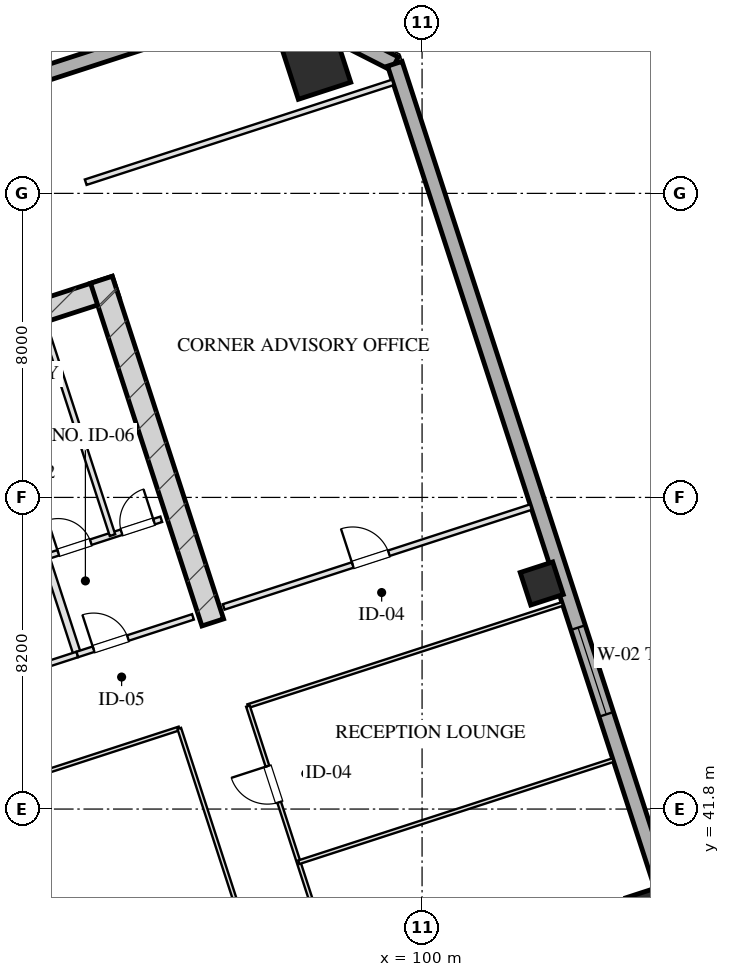
"""IFC4 building model, lengths in metres.
Left out: names, types, materials, properties, quantities, classifications, styles, units other than length and angle.
Written with IfcOpenShell. Run it as: python <this file> out.ifc"""

import sys

from ifc_helpers import new_model, si_unit, direction, frame, frame_2d, origin, origin_2d, place, context, subcontext, project, spatial, rectangle, hollow_rectangle, extrude, element, fill, save


model = new_model("IFC4")
c1 = context("Model", 3, precision=1e-05, world=origin(), true_north=direction((0.0, 1.0)))
c2 = subcontext(c1, "Body", "Model", "MODEL_VIEW")
j1 = project(units=[si_unit("LENGTHUNIT", "METRE"), si_unit("PLANEANGLEUNIT", "RADIAN")], contexts=[c1])
p1 = place(None, origin())
s1 = spatial("IfcSite", under=j1, at=p1, CompositionType="ELEMENT")
p2 = place(p1, origin())
s2 = spatial("IfcBuilding", under=s1, at=p2, CompositionType="ELEMENT")
p3 = place(p2, frame((0.0, 0.0, 106.95)))
s3 = spatial("IfcBuildingStorey", under=s2, at=p3, CompositionType="ELEMENT", Elevation=106.95)
p4 = place(p3, frame((76.344, 50.466, 0.0), z_axis=(0.0, 0.0, 1.0), x_axis=(0.951055727519, 0.309019421968, 0.0)))
e1 = element("IfcWall", 1, at=p4, inside=s3, PredefinedType="SHEAR", context=c2, shape_type="SweptSolid", body=[
    extrude(rectangle(XDim=16.4, YDim=0.6, at=frame_2d((8.2, 0.0))), origin(), (0.0, 0.0, 1.0), 3.45),
])
p5 = place(p3, frame((94.492, 46.71, 0.0), z_axis=(0.0, 0.0, 1.0), x_axis=(-0.309010370028, 0.95105866865, 0.0)))
e2 = element("IfcWall", 2, at=p5, inside=s3, PredefinedType="SHEAR", context=c2, shape_type="SweptSolid", body=[
    extrude(rectangle(XDim=9.48, YDim=0.6, at=frame_2d((4.74, 0.0))), origin(), (0.0, 0.0, 1.0), 3.45),
])
p6 = place(p3, frame((97.209, 61.388, 0.0), z_axis=(0.0, 0.0, 1.0), x_axis=(0.951056516295, 0.309016994375, 0.0)))
e3 = element("IfcColumn", 3, at=p6, inside=s3, PredefinedType="COLUMN", context=c2, shape_type="SweptSolid", body=[
    extrude(hollow_rectangle(XDim=1.45, YDim=1.45, WallThickness=0.05, at=origin_2d()), origin(), (0.0, 0.0, 1.0), 3.451),
])
for number, where, z_axis, x_axis in (
    (4, (105.93, 39.176, 0.0), (0.0, 0.0, 1.0), (0.951, 0.309, 0.0)),
    (5, (103.149, 47.736, 0.0), (0.0, 0.0, 1.0), (0.951, 0.309, 0.0)),
):
    element("IfcColumn", number, at=place(p3, frame(where, z_axis=z_axis, x_axis=x_axis)), inside=s3, PredefinedType="COLUMN", context=c2, shape_type="SweptSolid", body=[
        extrude(hollow_rectangle(XDim=0.9, YDim=0.9, WallThickness=0.032, at=origin_2d()), origin(), (0.0, 0.0, 1.0), 3.451),
    ])
p7 = place(p3, frame((68.047, 53.995, 0.0), z_axis=(0.0, 0.0, 1.0), x_axis=(0.95105505922, 0.309021478754, 0.0)))
e6 = element("IfcWall", 6, at=p7, inside=s3, PredefinedType="SOLIDWALL", context=c2, shape_type="SweptSolid", body=[
    extrude(rectangle(XDim=29.4, YDim=0.4, at=frame_2d((14.7, 0.0))), origin(), (0.0, 0.0, 1.0), 2.61),
])
p8 = place(p3, frame((96.008, 63.08, 0.0), z_axis=(0.0, 0.0, 1.0), x_axis=(0.891001999643, -0.45399937955, 0.0)))
e7 = element("IfcWall", 7, at=p8, inside=s3, PredefinedType="SOLIDWALL", context=c2, shape_type="SweptSolid", body=[
    extrude(rectangle(XDim=3.677, YDim=0.4, at=frame_2d((1.839, 0.0))), origin(), (0.0, 0.0, 1.0), 2.61),
])
p9 = place(p3, frame((99.284, 61.41, 0.0), z_axis=(0.0, 0.0, 1.0), x_axis=(0.309017542002, -0.95105633836, 0.0)))
e8 = element("IfcWall", 8, at=p9, inside=s3, PredefinedType="SOLIDWALL", context=c2, shape_type="SweptSolid", body=[
    extrude(rectangle(XDim=46.4, YDim=0.4, at=frame_2d((23.2, 0.0))), origin(), (0.0, 0.0, 1.0), 2.61),
])
p10 = place(p9, frame((28.4, 0.0, 0.75)))
e9 = element("IfcOpeningElement", 9, at=p10, cuts=e8, PredefinedType="OPENING", context=c2, shape_type="SweptSolid", body=[
    extrude(rectangle(XDim=2.4, YDim=1.46, at=frame_2d((1.2, 0.73))), frame((0.0, 0.21, 0.0), z_axis=(0.0, -1.0, 0.0), x_axis=(1.0, 0.0, 0.0)), (0.0, 0.0, 1.0), 0.42),
])
p11 = place(p9, frame((15.6, 0.0, 0.75)))
e10 = element("IfcOpeningElement", 10, at=p11, cuts=e8, PredefinedType="OPENING", context=c2, shape_type="SweptSolid", body=[
    extrude(rectangle(XDim=2.4, YDim=1.46, at=frame_2d((1.2, 0.73))), frame((0.0, 0.21, 0.0), z_axis=(0.0, -1.0, 0.0), x_axis=(1.0, 0.0, 0.0)), (0.0, 0.0, 1.0), 0.42),
])
p12 = place(p3, frame((90.928, 45.868, 0.0), z_axis=(0.0, 0.0, 1.0), x_axis=(-0.309042196757, 0.951048327176, 0.0)))
e11 = element("IfcWall", 11, at=p12, inside=s3, PredefinedType="PARTITIONING", context=c2, shape_type="SweptSolid", body=[
    extrude(rectangle(XDim=8.43, YDim=0.2, at=frame_2d((4.215, 0.0))), origin(), (0.0, 0.0, 1.0), 3.175),
])
p13 = place(p3, frame((86.743, 44.508, 0.0), z_axis=(0.0, 0.0, 1.0), x_axis=(0.951063829732, 0.308994485023, 0.0)))
e12 = element("IfcWall", 12, at=p13, inside=s3, PredefinedType="PARTITIONING", context=c2, shape_type="SweptSolid", body=[
    extrude(rectangle(XDim=4.4, YDim=0.15, at=frame_2d((2.2, 0.0))), origin(), (0.0, 0.0, 1.0), 3.175),
])
p14 = place(p13, frame((1.45, 0.0, 0.0)))
e13 = element("IfcOpeningElement", 13, at=p14, cuts=e12, PredefinedType="OPENING", context=c2, shape_type="SweptSolid", body=[
    extrude(rectangle(XDim=1.5, YDim=2.05, at=frame_2d((0.75, 1.025))), frame((0.0, 0.085, 0.0), z_axis=(0.0, -1.0, 0.0), x_axis=(1.0, 0.0, 0.0)), (0.0, 0.0, 1.0), 0.17),
])
p15 = place(p3, frame((90.928, 45.868, 0.0), z_axis=(0.0, 0.0, 1.0), x_axis=(0.951059297078, 0.309008435874, 0.0)))
e14 = element("IfcWall", 14, at=p15, inside=s3, PredefinedType="PARTITIONING", context=c2, shape_type="SweptSolid", body=[
    extrude(rectangle(XDim=3.2, YDim=0.15, at=frame_2d((1.6, 0.0))), origin(), (0.0, 0.0, 1.0), 3.175),
])
p16 = place(p15, frame((0.45, 0.0, 0.0)))
e15 = element("IfcOpeningElement", 15, at=p16, cuts=e14, PredefinedType="OPENING", context=c2, shape_type="SweptSolid", body=[
    extrude(rectangle(XDim=0.95, YDim=2.05, at=frame_2d((0.475, 1.025))), frame((0.0, 0.085, 0.0), z_axis=(0.0, -1.0, 0.0), x_axis=(1.0, 0.0, 0.0)), (0.0, 0.0, 1.0), 0.17),
])
p17 = place(p3, frame((90.094, 48.436, 0.0), z_axis=(0.0, 0.0, 1.0), x_axis=(0.951066581729, 0.308986014439, 0.0)))
e16 = element("IfcWall", 16, at=p17, inside=s3, PredefinedType="PARTITIONING", context=c2, shape_type="SweptSolid", body=[
    extrude(rectangle(XDim=3.2, YDim=0.15, at=frame_2d((1.6, 0.0))), origin(), (0.0, 0.0, 1.0), 3.175),
])
p18 = place(p17, frame((0.35, 0.0, 0.0)))
e17 = element("IfcOpeningElement", 17, at=p18, cuts=e16, PredefinedType="OPENING", context=c2, shape_type="SweptSolid", body=[
    extrude(rectangle(XDim=0.9, YDim=2.05, at=frame_2d((0.45, 1.025))), frame((0.0, 0.085, 0.0), z_axis=(0.0, -1.0, 0.0), x_axis=(1.0, 0.0, 0.0)), (0.0, 0.0, 1.0), 0.17),
])
p19 = place(p17, frame((2.1, 0.0, 0.0)))
e18 = element("IfcOpeningElement", 18, at=p19, cuts=e16, PredefinedType="OPENING", context=c2, shape_type="SweptSolid", body=[
    extrude(rectangle(XDim=0.9, YDim=2.05, at=frame_2d((0.45, 1.025))), frame((0.0, 0.085, 0.0), z_axis=(0.0, -1.0, 0.0), x_axis=(1.0, 0.0, 0.0)), (0.0, 0.0, 1.0), 0.17),
])
p20 = place(p3, frame((91.853, 49.007, 0.0), z_axis=(0.0, 0.0, 1.0), x_axis=(-0.309022487551, 0.951054731437, 0.0)))
e19 = element("IfcWall", 19, at=p20, inside=s3, PredefinedType="PARTITIONING", context=c2, shape_type="SweptSolid", body=[
    extrude(rectangle(XDim=5.73, YDim=0.15, at=frame_2d((2.865, 0.0))), origin(), (0.0, 0.0, 1.0), 3.175),
])
p21 = place(p3, frame((91.149, 58.294, 0.0), z_axis=(0.0, 0.0, 1.0), x_axis=(0.951062770994, 0.308997743729, 0.0)))
e20 = element("IfcWall", 20, at=p21, inside=s3, PredefinedType="PARTITIONING", context=c2, shape_type="SweptSolid", body=[
    extrude(rectangle(XDim=8.5, YDim=0.15, at=frame_2d((4.25, 0.0))), origin(), (0.0, 0.0, 1.0), 3.175),
])
p22 = place(p3, frame((94.78, 47.119, 0.0), z_axis=(0.0, 0.0, 1.0), x_axis=(0.951054329824, 0.309023723562, 0.0)))
e21 = element("IfcWall", 21, at=p22, inside=s3, PredefinedType="PARTITIONING", context=c2, shape_type="SweptSolid", body=[
    extrude(rectangle(XDim=8.5, YDim=0.15, at=frame_2d((4.25, 0.0))), origin(), (0.0, 0.0, 1.0), 3.175),
])
p23 = place(p22, frame((3.57, 0.0, 0.0)))
e22 = element("IfcOpeningElement", 22, at=p23, cuts=e21, PredefinedType="OPENING", context=c2, shape_type="SweptSolid", body=[
    extrude(rectangle(XDim=1.0, YDim=2.05, at=frame_2d((0.5, 1.025))), frame((0.0, 0.085, 0.0), z_axis=(0.0, -1.0, 0.0), x_axis=(1.0, 0.0, 0.0)), (0.0, 0.0, 1.0), 0.17),
])
p24 = place(p3, frame((86.097, 41.48, 0.0), z_axis=(0.0, 0.0, 1.0), x_axis=(0.951060182336, 0.309005711233, 0.0)))
e23 = element("IfcWall", 23, at=p24, inside=s3, PredefinedType="MOVABLE", context=c2, shape_type="SweptSolid", body=[
    extrude(rectangle(XDim=7.9, YDim=0.1, at=frame_2d((3.95, 0.0))), origin(), (0.0, 0.0, 1.0), 3.175),
])
p25 = place(p3, frame((95.418, 44.509, 0.0), z_axis=(0.0, 0.0, 1.0), x_axis=(0.951055307445, 0.309020714809, 0.0)))
e24 = element("IfcWall", 24, at=p25, inside=s3, PredefinedType="MOVABLE", context=c2, shape_type="SweptSolid", body=[
    extrude(rectangle(XDim=8.7, YDim=0.1, at=frame_2d((4.35, 0.0))), origin(), (0.0, 0.0, 1.0), 3.175),
])
p26 = place(p3, frame((91.24, 25.655, 0.0), z_axis=(0.0, 0.0, 1.0), x_axis=(-0.30901773025, 0.951056277195, 0.0)))
e25 = element("IfcWall", 25, at=p26, inside=s3, PredefinedType="MOVABLE", context=c2, shape_type="SweptSolid", body=[
    extrude(rectangle(XDim=16.64, YDim=0.1, at=frame_2d((8.32, 0.0))), origin(), (0.0, 0.0, 1.0), 3.175),
])
p27 = place(p26, frame((3.204, 0.0, 0.0)))
e26 = element("IfcOpeningElement", 26, at=p27, cuts=e25, PredefinedType="OPENING", context=c2, shape_type="SweptSolid", body=[
    extrude(rectangle(XDim=1.1, YDim=2.05, at=frame_2d((0.55, 1.025))), frame((0.0, 0.06, 0.0), z_axis=(0.0, -1.0, 0.0), x_axis=(1.0, 0.0, 0.0)), (0.0, 0.0, 1.0), 0.12),
])
p28 = place(p26, frame((11.404, 0.0, 0.0)))
e27 = element("IfcOpeningElement", 27, at=p28, cuts=e25, PredefinedType="OPENING", context=c2, shape_type="SweptSolid", body=[
    extrude(rectangle(XDim=1.1, YDim=2.05, at=frame_2d((0.55, 1.025))), frame((0.0, 0.06, 0.0), z_axis=(0.0, -1.0, 0.0), x_axis=(1.0, 0.0, 0.0)), (0.0, 0.0, 1.0), 0.12),
])
p29 = place(p3, frame((98.753, 28.096, 0.0), z_axis=(0.0, 0.0, 1.0), x_axis=(-0.30901773025, 0.951056277195, 0.0)))
e28 = element("IfcWall", 28, at=p29, inside=s3, PredefinedType="MOVABLE", context=c2, shape_type="SweptSolid", body=[
    extrude(rectangle(XDim=16.64, YDim=0.1, at=frame_2d((8.32, 0.0))), origin(), (0.0, 0.0, 1.0), 3.175),
])
p30 = place(p3, frame((100.56, 28.683, 0.0), z_axis=(0.0, 0.0, 1.0), x_axis=(-0.309004459387, 0.951060589068, 0.0)))
e29 = element("IfcWall", 29, at=p30, inside=s3, PredefinedType="MOVABLE", context=c2, shape_type="SweptSolid", body=[
    extrude(rectangle(XDim=16.64, YDim=0.1, at=frame_2d((8.32, 0.0))), origin(), (0.0, 0.0, 1.0), 3.175),
])
p31 = place(p30, frame((1.66, 0.0, 0.0)))
e30 = element("IfcOpeningElement", 30, at=p31, cuts=e29, PredefinedType="OPENING", context=c2, shape_type="SweptSolid", body=[
    extrude(rectangle(XDim=0.85, YDim=2.05, at=frame_2d((0.425, 1.025))), frame((0.0, 0.06, 0.0), z_axis=(0.0, -1.0, 0.0), x_axis=(1.0, 0.0, 0.0)), (0.0, 0.0, 1.0), 0.12),
])
p32 = place(p30, frame((7.82, 0.0, 0.0)))
e31 = element("IfcOpeningElement", 31, at=p32, cuts=e29, PredefinedType="OPENING", context=c2, shape_type="SweptSolid", body=[
    extrude(rectangle(XDim=1.05, YDim=2.05, at=frame_2d((0.525, 1.025))), frame((0.0, 0.06, 0.0), z_axis=(0.0, -1.0, 0.0), x_axis=(1.0, 0.0, 0.0)), (0.0, 0.0, 1.0), 0.12),
])
p33 = place(p30, frame((13.98, 0.0, 0.0)))
e32 = element("IfcOpeningElement", 32, at=p33, cuts=e29, PredefinedType="OPENING", context=c2, shape_type="SweptSolid", body=[
    extrude(rectangle(XDim=1.0, YDim=2.05, at=frame_2d((0.5, 1.025))), frame((0.0, 0.06, 0.0), z_axis=(0.0, -1.0, 0.0), x_axis=(1.0, 0.0, 0.0)), (0.0, 0.0, 1.0), 0.12),
])
p34 = place(p3, frame((96.753, 40.4, 0.0), z_axis=(0.0, 0.0, 1.0), x_axis=(0.951057987102, 0.309012467661, 0.0)))
e33 = element("IfcWall", 33, at=p34, inside=s3, PredefinedType="MOVABLE", context=c2, shape_type="SweptSolid", body=[
    extrude(rectangle(XDim=8.7, YDim=0.1, at=frame_2d((4.35, 0.0))), origin(), (0.0, 0.0, 1.0), 3.175),
])
p35 = place(p11, origin())
e34 = element("IfcWindow", 34, at=p35, inside=s3, PartitioningType="TRIPLE_PANEL_VERTICAL", PredefinedType="WINDOW", context=c2, shape_type="SweptSolid", body=[
    extrude(rectangle(XDim=2.4, YDim=1.46, at=frame_2d((1.2, 0.73))), frame((0.0, 0.03, 0.0), z_axis=(0.0, -1.0, 0.0), x_axis=(1.0, 0.0, 0.0)), (0.0, 0.0, 1.0), 0.06),
])
fill(e10, e34)
p36 = place(p16, origin())
e35 = element("IfcDoor", 35, at=p36, inside=s3, OperationType="SINGLE_SWING_LEFT", PredefinedType="DOOR", context=c2, shape_type="SweptSolid", body=[
    extrude(rectangle(XDim=0.95, YDim=2.05, at=frame_2d((0.475, 1.025))), frame((0.0, 0.025, 0.0), z_axis=(0.0, -1.0, 0.0), x_axis=(1.0, 0.0, 0.0)), (0.0, 0.0, 1.0), 0.05),
])
fill(e15, e35)
p37 = place(p18, origin())
e36 = element("IfcDoor", 36, at=p37, inside=s3, OperationType="SINGLE_SWING_LEFT", PredefinedType="DOOR", context=c2, shape_type="SweptSolid", body=[
    extrude(rectangle(XDim=0.9, YDim=2.05, at=frame_2d((0.45, 1.025))), frame((0.0, 0.025, 0.0), z_axis=(0.0, -1.0, 0.0), x_axis=(1.0, 0.0, 0.0)), (0.0, 0.0, 1.0), 0.05),
])
fill(e17, e36)
p38 = place(p19, origin())
e37 = element("IfcDoor", 37, at=p38, inside=s3, OperationType="SINGLE_SWING_RIGHT", PredefinedType="DOOR", context=c2, shape_type="SweptSolid", body=[
    extrude(rectangle(XDim=0.9, YDim=2.05, at=frame_2d((0.45, 1.025))), frame((0.0, 0.025, 0.0), z_axis=(0.0, -1.0, 0.0), x_axis=(1.0, 0.0, 0.0)), (0.0, 0.0, 1.0), 0.05),
])
fill(e18, e37)
p39 = place(p23, origin())
e38 = element("IfcDoor", 38, at=p39, inside=s3, OperationType="SINGLE_SWING_LEFT", PredefinedType="DOOR", context=c2, shape_type="SweptSolid", body=[
    extrude(rectangle(XDim=1.0, YDim=2.05, at=frame_2d((0.5, 1.025))), frame((0.0, 0.025, 0.0), z_axis=(0.0, -1.0, 0.0), x_axis=(1.0, 0.0, 0.0)), (0.0, 0.0, 1.0), 0.05),
])
fill(e22, e38)
p40 = place(p33, origin())
e39 = element("IfcDoor", 39, at=p40, inside=s3, OperationType="SINGLE_SWING_RIGHT", PredefinedType="DOOR", context=c2, shape_type="SweptSolid", body=[
    extrude(rectangle(XDim=1.0, YDim=2.05, at=frame_2d((0.5, 1.025))), frame((0.0, 0.025, 0.0), z_axis=(0.0, -1.0, 0.0), x_axis=(1.0, 0.0, 0.0)), (0.0, 0.0, 1.0), 0.05),
])
fill(e32, e39)
save(model, sys.argv[1])
